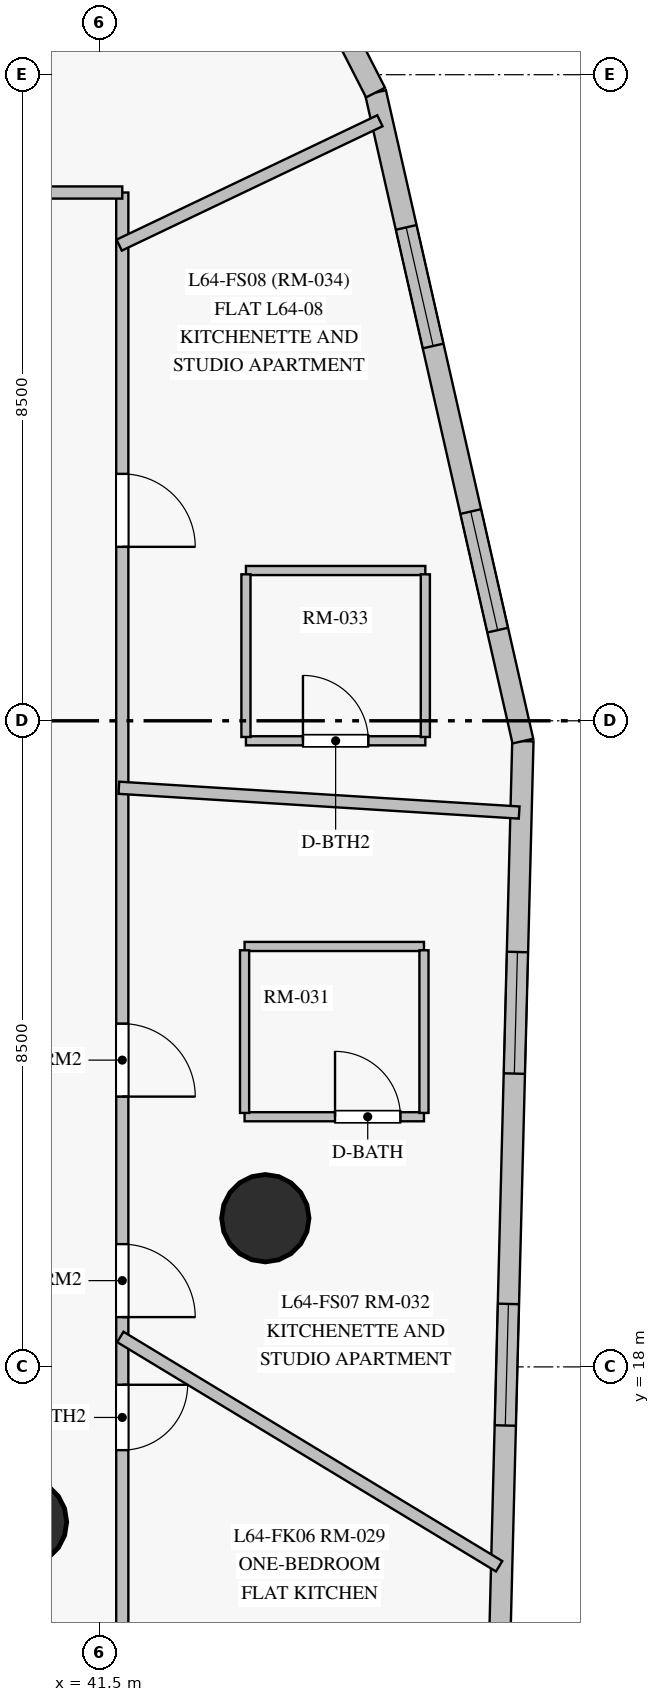
"""IFC4 building model, lengths in metres.
Left out: names, types, materials, properties, quantities, classifications, styles, units other than length and angle.
Written with IfcOpenShell. Run it as: python <this file> out.ifc"""

import sys

from ifc_helpers import new_model, si_unit, direction, frame, frame_2d, origin, origin_with_axes, origin_2d, place, context, subcontext, project, spatial, rectangle, circle, extrude, source, transform, mapped, element, fill, save


model = new_model("IFC4")
c1 = context("Model", 3, precision=1e-05, world=origin(), true_north=direction((0.0, 1.0)))
c2 = subcontext(c1, "Body", "Model", "MODEL_VIEW")
j1 = project(units=[si_unit("LENGTHUNIT", "METRE"), si_unit("PLANEANGLEUNIT", "RADIAN")], contexts=[c1])
p1 = place(None, origin())
s1 = spatial("IfcSite", under=j1, at=p1, CompositionType="ELEMENT")
p2 = place(p1, origin())
s2 = spatial("IfcBuilding", under=s1, at=p2, CompositionType="ELEMENT")
p3 = place(p2, frame((0.0, 0.0, 219.95)))
s3 = spatial("IfcBuildingStorey", under=s2, at=p3, CompositionType="ELEMENT", Elevation=219.95)
m1 = source(origin_with_axes(), c2, "Body", "SweptSolid", [
    extrude(circle(Radius=0.575, at=origin_2d()), origin(), (0.0, 0.0, 1.0), 3.05),
])
for number, where, z_axis, x_axis in (
    (1, (43.682, 19.956, 0.0), (0.0, 0.0, 1.0), (1.0, 0.0, 0.0)),
    (2, (40.494, 15.96, 0.0), (0.0, 0.0, 1.0), (1.0, 0.0, 0.0)),
):
    element("IfcColumn", number, at=place(p3, frame(where, z_axis=z_axis, x_axis=x_axis)), inside=s3, PredefinedType="COLUMN", context=c2, shape_type="MappedRepresentation", body=[
        mapped(m1, transform((0.0, 0.0, 0.0), scale=1.0)),
    ])
p4 = place(p3, frame((46.744, 13.53, 0.0), z_axis=(0.0, 0.0, 1.0), x_axis=(0.025686260169, 0.999670053587, 0.0)))
e3 = element("IfcWall", 3, at=p4, inside=s3, PredefinedType="SOLIDWALL", context=c2, shape_type="SweptSolid", body=[
    extrude(rectangle(XDim=12.708, YDim=0.28, at=frame_2d((6.354, 0.0))), origin(), (0.0, 0.0, 1.0), 2.85),
])
p5 = place(p4, frame((3.7, 0.0, 0.85)))
e4 = element("IfcOpeningElement", 4, at=p5, cuts=e3, PredefinedType="OPENING", context=c2, shape_type="SweptSolid", body=[
    extrude(rectangle(XDim=1.6, YDim=1.6, at=frame_2d((0.8, 0.8))), frame((0.0, 0.15, 0.0), z_axis=(0.0, -1.0, 0.0), x_axis=(1.0, 0.0, 0.0)), (0.0, 0.0, 1.0), 0.3),
])
p6 = place(p4, frame((8.332, 0.0, 0.85)))
e5 = element("IfcOpeningElement", 5, at=p6, cuts=e3, PredefinedType="OPENING", context=c2, shape_type="SweptSolid", body=[
    extrude(rectangle(XDim=1.6, YDim=1.6, at=frame_2d((0.8, 0.8))), frame((0.0, 0.15, 0.0), z_axis=(0.0, -1.0, 0.0), x_axis=(1.0, 0.0, 0.0)), (0.0, 0.0, 1.0), 0.3),
])
p7 = place(p3, frame((47.07, 26.233, 0.0), z_axis=(0.0, 0.0, 1.0), x_axis=(-0.221540292546, 0.975151218416, 0.0)))
e6 = element("IfcWall", 6, at=p7, inside=s3, PredefinedType="SOLIDWALL", context=c2, shape_type="SweptSolid", body=[
    extrude(rectangle(XDim=8.749, YDim=0.28, at=frame_2d((4.375, 0.0))), origin(), (0.0, 0.0, 1.0), 2.85),
])
p8 = place(p7, frame((1.497, 0.0, 0.85)))
e7 = element("IfcOpeningElement", 7, at=p8, cuts=e6, PredefinedType="OPENING", context=c2, shape_type="SweptSolid", body=[
    extrude(rectangle(XDim=1.6, YDim=1.6, at=frame_2d((0.8, 0.8))), frame((0.0, 0.15, 0.0), z_axis=(0.0, -1.0, 0.0), x_axis=(1.0, 0.0, 0.0)), (0.0, 0.0, 1.0), 0.3),
])
p9 = place(p7, frame((5.33, 0.0, 0.85)))
e8 = element("IfcOpeningElement", 8, at=p9, cuts=e6, PredefinedType="OPENING", context=c2, shape_type="SweptSolid", body=[
    extrude(rectangle(XDim=1.6, YDim=1.6, at=frame_2d((0.8, 0.8))), frame((0.0, 0.15, 0.0), z_axis=(0.0, -1.0, 0.0), x_axis=(1.0, 0.0, 0.0)), (0.0, 0.0, 1.0), 0.3),
])
p10 = place(p3, frame((45.132, 34.765, 0.0), z_axis=(0.0, 0.0, 1.0), x_axis=(-0.45509616546, 0.890442294696, 0.0)))
e9 = element("IfcWall", 9, at=p10, inside=s3, PredefinedType="SOLIDWALL", context=c2, shape_type="SweptSolid", body=[
    extrude(rectangle(XDim=12.708, YDim=0.28, at=frame_2d((6.354, 0.0))), origin(), (0.0, 0.0, 1.0), 2.85),
])
p11 = place(p10, frame((1.571, 0.0, 0.85)))
e10 = element("IfcOpeningElement", 10, at=p11, cuts=e9, PredefinedType="OPENING", context=c2, shape_type="SweptSolid", body=[
    extrude(rectangle(XDim=1.6, YDim=1.6, at=frame_2d((0.8, 0.8))), frame((0.0, 0.15, 0.0), z_axis=(0.0, -1.0, 0.0), x_axis=(1.0, 0.0, 0.0)), (0.0, 0.0, 1.0), 0.3),
])
p12 = place(p10, frame((5.554, 0.0, 0.85)))
e11 = element("IfcOpeningElement", 11, at=p12, cuts=e9, PredefinedType="OPENING", context=c2, shape_type="SweptSolid", body=[
    extrude(rectangle(XDim=1.6, YDim=1.6, at=frame_2d((0.8, 0.8))), frame((0.0, 0.15, 0.0), z_axis=(0.0, -1.0, 0.0), x_axis=(1.0, 0.0, 0.0)), (0.0, 0.0, 1.0), 0.3),
])
p13 = place(p10, frame((9.536, 0.0, 0.85)))
e12 = element("IfcOpeningElement", 12, at=p13, cuts=e9, PredefinedType="OPENING", context=c2, shape_type="SweptSolid", body=[
    extrude(rectangle(XDim=1.6, YDim=1.6, at=frame_2d((0.8, 0.8))), frame((0.0, 0.15, 0.0), z_axis=(0.0, -1.0, 0.0), x_axis=(1.0, 0.0, 0.0)), (0.0, 0.0, 1.0), 0.3),
])
p14 = place(p3, frame((41.8, 33.45, 0.0), z_axis=(0.0, 0.0, 1.0), x_axis=(0.0, -1.0, 0.0)))
e13 = element("IfcWall", 13, at=p14, inside=s3, PredefinedType="PARTITIONING", context=c2, shape_type="SweptSolid", body=[
    extrude(rectangle(XDim=19.6, YDim=0.16, at=frame_2d((9.8, 0.0))), origin(), (0.0, 0.0, 1.0), 2.3),
])
p15 = place(p14, frame((13.835, 0.0, 0.0)))
e14 = element("IfcOpeningElement", 14, at=p15, cuts=e13, PredefinedType="OPENING", context=c2, shape_type="SweptSolid", body=[
    extrude(rectangle(XDim=0.96, YDim=2.15, at=frame_2d((0.48, 1.075))), frame((0.0, 0.09, 0.0), z_axis=(0.0, -1.0, 0.0), x_axis=(1.0, 0.0, 0.0)), (0.0, 0.0, 1.0), 0.18),
])
p16 = place(p14, frame((10.934, 0.0, 0.0)))
e15 = element("IfcOpeningElement", 15, at=p16, cuts=e13, PredefinedType="OPENING", context=c2, shape_type="SweptSolid", body=[
    extrude(rectangle(XDim=0.96, YDim=2.15, at=frame_2d((0.48, 1.075))), frame((0.0, 0.09, 0.0), z_axis=(0.0, -1.0, 0.0), x_axis=(1.0, 0.0, 0.0)), (0.0, 0.0, 1.0), 0.18),
])
p17 = place(p14, frame((3.701, 0.0, 0.0)))
e16 = element("IfcOpeningElement", 16, at=p17, cuts=e13, PredefinedType="OPENING", context=c2, shape_type="SweptSolid", body=[
    extrude(rectangle(XDim=0.96, YDim=2.15, at=frame_2d((0.48, 1.075))), frame((0.0, 0.09, 0.0), z_axis=(0.0, -1.0, 0.0), x_axis=(1.0, 0.0, 0.0)), (0.0, 0.0, 1.0), 0.18),
])
p18 = place(p14, frame((15.685, 0.0, 0.0)))
e17 = element("IfcOpeningElement", 17, at=p18, cuts=e13, PredefinedType="OPENING", context=c2, shape_type="SweptSolid", body=[
    extrude(rectangle(XDim=0.86, YDim=2.04, at=frame_2d((0.43, 1.02))), frame((0.0, 0.09, 0.0), z_axis=(0.0, -1.0, 0.0), x_axis=(1.0, 0.0, 0.0)), (0.0, 0.0, 1.0), 0.18),
])
p19 = place(p3, frame((41.774, 18.394, 0.0), z_axis=(0.0, 0.0, 1.0), x_axis=(0.855456106039, -0.517875323453, 0.0)))
e18 = element("IfcWall", 18, at=p19, inside=s3, PredefinedType="PARTITIONING", context=c2, shape_type="SweptSolid", body=[
    extrude(rectangle(XDim=5.825, YDim=0.16, at=frame_2d((2.913, 0.0))), origin(), (0.0, 0.0, 1.0), 2.85),
])
p20 = place(p3, frame((41.755, 25.619, 0.0), z_axis=(0.0, 0.0, 1.0), x_axis=(0.998090381623, -0.061770463097, 0.0)))
e19 = element("IfcWall", 19, at=p20, inside=s3, PredefinedType="PARTITIONING", context=c2, shape_type="SweptSolid", body=[
    extrude(rectangle(XDim=5.276, YDim=0.16, at=frame_2d((2.638, 0.0))), origin(), (0.0, 0.0, 1.0), 2.85),
])
p21 = place(p3, frame((37.682, 33.45, 0.0), z_axis=(0.0, 0.0, 1.0), x_axis=(1.0, 0.0, 0.0)))
e20 = element("IfcWall", 20, at=p21, inside=s3, PredefinedType="PARTITIONING", context=c2, shape_type="SweptSolid", body=[
    extrude(rectangle(XDim=4.118, YDim=0.16, at=frame_2d((2.059, 0.0))), origin(), (0.0, 0.0, 1.0), 2.85),
])
p22 = place(p3, frame((41.76, 32.758, 0.0), z_axis=(0.0, 0.0, 1.0), x_axis=(0.902574106557, 0.430534530755, 0.0)))
e21 = element("IfcWall", 21, at=p22, inside=s3, PredefinedType="PARTITIONING", context=c2, shape_type="SweptSolid", body=[
    extrude(rectangle(XDim=3.8, YDim=0.16, at=frame_2d((1.9, 0.0))), origin(), (0.0, 0.0, 1.0), 2.85),
])
p23 = place(p3, frame((43.409, 21.291, 0.0), z_axis=(0.0, 0.0, 1.0), x_axis=(1.0, 0.0, 0.0)))
e22 = element("IfcWall", 22, at=p23, inside=s3, PredefinedType="PARTITIONING", context=c2, shape_type="SweptSolid", body=[
    extrude(rectangle(XDim=2.36, YDim=0.12, at=frame_2d((1.18, 0.0))), origin(), (0.0, 0.0, 1.0), 2.85),
])
p24 = place(p23, frame((1.19, 0.0, 0.0)))
e23 = element("IfcOpeningElement", 23, at=p24, cuts=e22, PredefinedType="OPENING", context=c2, shape_type="SweptSolid", body=[
    extrude(rectangle(XDim=0.86, YDim=2.1, at=frame_2d((0.43, 1.05))), frame((0.0, 0.07, 0.0), z_axis=(0.0, -1.0, 0.0), x_axis=(1.0, 0.0, 0.0)), (0.0, 0.0, 1.0), 0.14),
])
p25 = place(p3, frame((45.769, 23.531, 0.0), z_axis=(0.0, 0.0, 1.0), x_axis=(-1.0, 0.0, 0.0)))
e24 = element("IfcWall", 24, at=p25, inside=s3, PredefinedType="PARTITIONING", context=c2, shape_type="SweptSolid", body=[
    extrude(rectangle(XDim=2.36, YDim=0.12, at=frame_2d((1.18, 0.0))), origin(), (0.0, 0.0, 1.0), 2.85),
])
p26 = place(p3, frame((43.427, 26.237, 0.0), z_axis=(0.0, 0.0, 1.0), x_axis=(1.0, 0.0, 0.0)))
e25 = element("IfcWall", 25, at=p26, inside=s3, PredefinedType="PARTITIONING", context=c2, shape_type="SweptSolid", body=[
    extrude(rectangle(XDim=2.36, YDim=0.12, at=frame_2d((1.18, 0.0))), origin(), (0.0, 0.0, 1.0), 2.85),
])
p27 = place(p26, frame((0.75, 0.0, 0.0)))
e26 = element("IfcOpeningElement", 26, at=p27, cuts=e25, PredefinedType="OPENING", context=c2, shape_type="SweptSolid", body=[
    extrude(rectangle(XDim=0.86, YDim=2.04, at=frame_2d((0.43, 1.02))), frame((0.0, 0.07, 0.0), z_axis=(0.0, -1.0, 0.0), x_axis=(1.0, 0.0, 0.0)), (0.0, 0.0, 1.0), 0.14),
])
p28 = place(p3, frame((45.787, 28.477, 0.0), z_axis=(0.0, 0.0, 1.0), x_axis=(-1.0, 0.0, 0.0)))
e27 = element("IfcWall", 27, at=p28, inside=s3, PredefinedType="PARTITIONING", context=c2, shape_type="SweptSolid", body=[
    extrude(rectangle(XDim=2.36, YDim=0.12, at=frame_2d((1.18, 0.0))), origin(), (0.0, 0.0, 1.0), 2.85),
])
p29 = place(p3, frame((45.769, 21.341, 0.0), z_axis=(0.0, 0.0, 1.0), x_axis=(0.0, 1.0, 0.0)))
e28 = element("IfcWall", 28, at=p29, inside=s3, PredefinedType="PARTITIONING", context=c2, shape_type="SweptSolid", body=[
    extrude(rectangle(XDim=2.14, YDim=0.12, at=frame_2d((1.07, 0.0))), origin(), (0.0, 0.0, 1.0), 2.85),
])
p30 = place(p3, frame((43.409, 23.481, 0.0), z_axis=(0.0, 0.0, 1.0), x_axis=(0.0, -1.0, 0.0)))
e29 = element("IfcWall", 29, at=p30, inside=s3, PredefinedType="PARTITIONING", context=c2, shape_type="SweptSolid", body=[
    extrude(rectangle(XDim=2.14, YDim=0.12, at=frame_2d((1.07, 0.0))), origin(), (0.0, 0.0, 1.0), 2.3),
])
for number, where, z_axis, x_axis in (
    (30, (45.787, 26.287, 0.0), (0.0, 0.0, 1.0), (0.0, 1.0, 0.0)),
    (31, (43.427, 28.427, 0.0), (0.0, 0.0, 1.0), (0.0, -1.0, 0.0)),
):
    element("IfcWall", number, at=place(p3, frame(where, z_axis=z_axis, x_axis=x_axis)), inside=s3, PredefinedType="PARTITIONING", context=c2, shape_type="SweptSolid", body=[
        extrude(rectangle(XDim=2.14, YDim=0.12, at=frame_2d((1.07, 0.0))), origin(), (0.0, 0.0, 1.0), 2.85),
    ])
m2 = source(origin_with_axes(), c2, "Body", "SweptSolid", [
    extrude(rectangle(XDim=1.6, YDim=1.6, at=frame_2d((0.8, 0.8))), frame((0.0, 0.03, 0.0), z_axis=(0.0, -1.0, 0.0), x_axis=(1.0, 0.0, 0.0)), (0.0, 0.0, 1.0), 0.06),
])
p31 = place(p5, origin())
e32 = element("IfcWindow", 32, at=p31, inside=s3, PartitioningType="SINGLE_PANEL", PredefinedType="WINDOW", context=c2, shape_type="MappedRepresentation", body=[
    mapped(m2, transform((0.0, 0.0, 0.0), scale=1.0)),
])
fill(e4, e32)
p32 = place(p6, origin())
e33 = element("IfcWindow", 33, at=p32, inside=s3, PartitioningType="SINGLE_PANEL", PredefinedType="WINDOW", context=c2, shape_type="MappedRepresentation", body=[
    mapped(m2, transform((0.0, 0.0, 0.0), scale=1.0)),
])
fill(e5, e33)
p33 = place(p8, origin())
e34 = element("IfcWindow", 34, at=p33, inside=s3, PartitioningType="SINGLE_PANEL", PredefinedType="WINDOW", context=c2, shape_type="MappedRepresentation", body=[
    mapped(m2, transform((0.0, 0.0, 0.0), scale=1.0)),
])
fill(e7, e34)
p34 = place(p9, origin())
e35 = element("IfcWindow", 35, at=p34, inside=s3, PartitioningType="SINGLE_PANEL", PredefinedType="WINDOW", context=c2, shape_type="MappedRepresentation", body=[
    mapped(m2, transform((0.0, 0.0, 0.0), scale=1.0)),
])
fill(e8, e35)
m3 = source(origin_with_axes(), c2, "Body", "SweptSolid", [
    extrude(rectangle(XDim=0.96, YDim=2.15, at=frame_2d((0.48, 1.075))), frame((0.0, 0.025, 0.0), z_axis=(0.0, -1.0, 0.0), x_axis=(1.0, 0.0, 0.0)), (0.0, 0.0, 1.0), 0.05),
])
p35 = place(p15, origin())
e36 = element("IfcDoor", 36, at=p35, inside=s3, OperationType="SINGLE_SWING_RIGHT", PredefinedType="DOOR", context=c2, shape_type="MappedRepresentation", body=[
    mapped(m3, transform((0.0, 0.0, 0.0), scale=1.0)),
])
fill(e14, e36)
m4 = source(origin_with_axes(), c2, "Body", "SweptSolid", [
    extrude(rectangle(XDim=0.86, YDim=2.1, at=frame_2d((0.43, 1.05))), frame((0.0, 0.025, 0.0), z_axis=(0.0, -1.0, 0.0), x_axis=(1.0, 0.0, 0.0)), (0.0, 0.0, 1.0), 0.05),
])
p36 = place(p24, origin())
e37 = element("IfcDoor", 37, at=p36, inside=s3, OperationType="SINGLE_SWING_LEFT", PredefinedType="DOOR", context=c2, shape_type="MappedRepresentation", body=[
    mapped(m4, transform((0.0, 0.0, 0.0), scale=1.0)),
])
fill(e23, e37)
p37 = place(p16, origin())
e38 = element("IfcDoor", 38, at=p37, inside=s3, OperationType="SINGLE_SWING_RIGHT", PredefinedType="DOOR", context=c2, shape_type="MappedRepresentation", body=[
    mapped(m3, transform((0.0, 0.0, 0.0), scale=1.0)),
])
fill(e15, e38)
m5 = source(origin_with_axes(), c2, "Body", "SweptSolid", [
    extrude(rectangle(XDim=0.86, YDim=2.04, at=frame_2d((0.43, 1.02))), frame((0.0, 0.025, 0.0), z_axis=(0.0, -1.0, 0.0), x_axis=(1.0, 0.0, 0.0)), (0.0, 0.0, 1.0), 0.05),
])
p38 = place(p27, origin())
e39 = element("IfcDoor", 39, at=p38, inside=s3, OperationType="SINGLE_SWING_LEFT", PredefinedType="DOOR", context=c2, shape_type="MappedRepresentation", body=[
    mapped(m5, transform((0.0, 0.0, 0.0), scale=1.0)),
])
fill(e26, e39)
p39 = place(p17, origin())
e40 = element("IfcDoor", 40, at=p39, inside=s3, OperationType="SINGLE_SWING_RIGHT", PredefinedType="DOOR", context=c2, shape_type="MappedRepresentation", body=[
    mapped(m3, transform((0.0, 0.0, 0.0), scale=1.0)),
])
fill(e16, e40)
p40 = place(p18, origin())
e41 = element("IfcDoor", 41, at=p40, inside=s3, OperationType="SINGLE_SWING_LEFT", PredefinedType="DOOR", context=c2, shape_type="MappedRepresentation", body=[
    mapped(m5, transform((0.0, 0.0, 0.0), scale=1.0)),
])
fill(e17, e41)
save(model, sys.argv[1])
